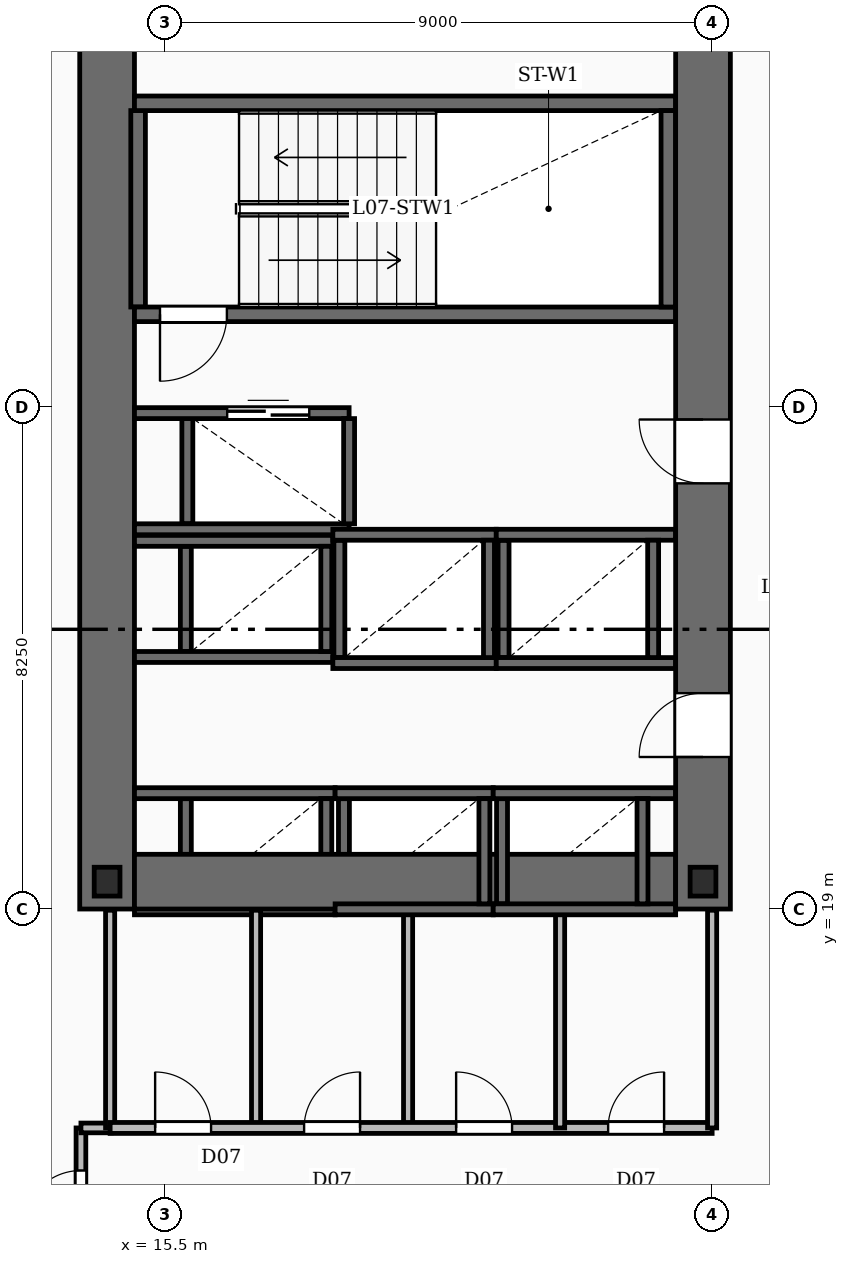
"""IFC4 building model, lengths in metres.
Left out: names, types, materials, properties, quantities, classifications, styles, units other than length and angle.
Written with IfcOpenShell. Run it as: python <this file> out.ifc"""

import sys

from ifc_helpers import new_model, si_unit, direction, frame, frame_2d, origin, origin_2d, place, context, subcontext, project, spatial, rectangle, i_section, extrude, element, fill, save


model = new_model("IFC4")
c1 = context("Model", 3, precision=1e-05, world=origin(), true_north=direction((0.0, 1.0)))
c2 = subcontext(c1, "Body", "Model", "MODEL_VIEW")
j1 = project(units=[si_unit("LENGTHUNIT", "METRE"), si_unit("PLANEANGLEUNIT", "RADIAN")], contexts=[c1])
p1 = place(None, origin())
s1 = spatial("IfcSite", under=j1, at=p1, CompositionType="ELEMENT")
p2 = place(p1, origin())
s2 = spatial("IfcBuilding", under=s1, at=p2, CompositionType="ELEMENT")
p3 = place(p2, frame((0.0, 0.0, 42.0)))
s3 = spatial("IfcBuildingStorey", under=s2, at=p3, CompositionType="ELEMENT", Elevation=42.0)
p4 = place(p3, frame((14.55, 19.0, -0.45), z_axis=(0.0, 0.0, 1.0), x_axis=(0.0, 1.0, 0.0)))
e1 = element("IfcWall", 1, at=p4, inside=s3, PredefinedType="SHEAR", context=c2, shape_type="SweptSolid", body=[
    extrude(rectangle(XDim=15.3, YDim=0.9, at=frame_2d((7.65, 0.0))), origin(), (0.0, 0.0, 1.0), 3.93),
])
p5 = place(p3, frame((24.35, 19.0, -0.45), z_axis=(0.0, 0.0, 1.0), x_axis=(0.0, 1.0, 0.0)))
e2 = element("IfcWall", 2, at=p5, inside=s3, PredefinedType="SHEAR", context=c2, shape_type="SweptSolid", body=[
    extrude(rectangle(XDim=15.3, YDim=0.9, at=frame_2d((7.65, 0.0))), origin(), (0.0, 0.0, 1.0), 3.93),
])
p6 = place(p5, frame((2.5, 0.0, 0.45)))
e3 = element("IfcOpeningElement", 3, at=p6, cuts=e2, PredefinedType="OPENING", context=c2, shape_type="SweptSolid", body=[
    extrude(rectangle(XDim=1.05, YDim=2.15, at=frame_2d((0.525, 1.075))), frame((0.0, 0.46, 0.0), z_axis=(0.0, -1.0, 0.0), x_axis=(1.0, 0.0, 0.0)), (0.0, 0.0, 1.0), 0.92),
])
p7 = place(p5, frame((7.0, 0.0, 0.45)))
e4 = element("IfcOpeningElement", 4, at=p7, cuts=e2, PredefinedType="OPENING", context=c2, shape_type="SweptSolid", body=[
    extrude(rectangle(XDim=1.05, YDim=2.15, at=frame_2d((0.525, 1.075))), frame((0.0, 0.46, 0.0), z_axis=(0.0, -1.0, 0.0), x_axis=(1.0, 0.0, 0.0)), (0.0, 0.0, 1.0), 0.92),
])
p8 = place(p3, frame((15.0, 19.45, -0.45), z_axis=(0.0, 0.0, 1.0), x_axis=(1.0, 0.0, 0.0)))
e5 = element("IfcWall", 5, at=p8, inside=s3, PredefinedType="SHEAR", context=c2, shape_type="SweptSolid", body=[
    extrude(rectangle(XDim=8.9, YDim=0.9, at=frame_2d((4.45, 0.0))), origin(), (0.0, 0.0, 1.0), 3.93),
])
for number, where, z_axis, x_axis in (
    (6, (14.55, 19.45, -0.45), (0.0, 0.0, 1.0), (1.0, 0.0, 0.0)),
    (7, (24.35, 19.45, -0.45), (0.0, 0.0, 1.0), (1.0, 0.0, 0.0)),
):
    element("IfcColumn", number, at=place(p3, frame(where, z_axis=z_axis, x_axis=x_axis)), inside=s3, PredefinedType="COLUMN", context=c2, shape_type="SweptSolid", body=[
        extrude(i_section(OverallWidth=0.424, OverallDepth=0.474, WebThickness=0.048, FlangeThickness=0.077, FilletRadius=0.02, at=origin_2d()), origin(), (0.0, 0.0, 1.0), 3.93),
    ])
p9 = place(p3, frame((23.9, 28.78, 0.0), z_axis=(0.0, 0.0, 1.0), x_axis=(-1.0, 0.0, 0.0)))
e8 = element("IfcWall", 8, at=p9, inside=s3, PredefinedType="SOLIDWALL", context=c2, shape_type="SweptSolid", body=[
    extrude(rectangle(XDim=8.9, YDim=0.24, at=frame_2d((4.45, 0.0))), origin(), (0.0, 0.0, 1.0), 3.48),
])
p10 = place(p9, frame((7.38, 0.0, 0.0)))
e9 = element("IfcOpeningElement", 9, at=p10, cuts=e8, PredefinedType="OPENING", context=c2, shape_type="SweptSolid", body=[
    extrude(rectangle(XDim=1.1, YDim=2.15, at=frame_2d((0.55, 1.075))), frame((0.0, 0.13, 0.0), z_axis=(0.0, -1.0, 0.0), x_axis=(1.0, 0.0, 0.0)), (0.0, 0.0, 1.0), 0.26),
])
p11 = place(p3, frame((15.0, 32.25, 0.0), z_axis=(0.0, 0.0, 1.0), x_axis=(1.0, 0.0, 0.0)))
e10 = element("IfcWall", 10, at=p11, inside=s3, PredefinedType="SOLIDWALL", context=c2, shape_type="SweptSolid", body=[
    extrude(rectangle(XDim=8.9, YDim=0.24, at=frame_2d((4.45, 0.0))), origin(), (0.0, 0.0, 1.0), 3.48),
])
for number, where, z_axis, x_axis in (
    (11, (15.06, 28.9, 0.0), (0.0, 0.0, 1.0), (0.0, 1.0, 0.0)),
    (12, (23.78, 28.9, 0.0), (0.0, 0.0, 1.0), (0.0, 1.0, 0.0)),
):
    element("IfcWall", number, at=place(p3, frame(where, z_axis=z_axis, x_axis=x_axis)), inside=s3, PredefinedType="SOLIDWALL", context=c2, shape_type="SweptSolid", body=[
        extrude(rectangle(XDim=3.23, YDim=0.24, at=frame_2d((1.615, 0.0))), origin(), (0.0, 0.0, 1.0), 3.48),
    ])
for number, where, z_axis, x_axis in (
    (13, (15.0, 20.905, 0.0), (0.0, 0.0, 1.0), (1.0, 0.0, 0.0)),
    (14, (15.0, 18.995, 0.0), (0.0, 0.0, 1.0), (1.0, 0.0, 0.0)),
):
    element("IfcWall", number, at=place(p3, frame(where, z_axis=z_axis, x_axis=x_axis)), inside=s3, PredefinedType="SOLIDWALL", context=c2, shape_type="SweptSolid", body=[
        extrude(rectangle(XDim=3.3, YDim=0.18, at=frame_2d((1.65, 0.0))), origin(), (0.0, 0.0, 1.0), 3.48),
    ])
for number, where, z_axis, x_axis in (
    (15, (15.845, 19.085, 0.0), (0.0, 0.0, 1.0), (0.0, 1.0, 0.0)),
    (16, (18.155, 19.085, 0.0), (0.0, 0.0, 1.0), (0.0, 1.0, 0.0)),
):
    element("IfcWall", number, at=place(p3, frame(where, z_axis=z_axis, x_axis=x_axis)), inside=s3, PredefinedType="SOLIDWALL", context=c2, shape_type="SweptSolid", body=[
        extrude(rectangle(XDim=1.73, YDim=0.18, at=frame_2d((0.865, 0.0))), origin(), (0.0, 0.0, 1.0), 3.48),
    ])
for number, where, z_axis, x_axis in (
    (17, (18.3, 20.905, 0.0), (0.0, 0.0, 1.0), (1.0, 0.0, 0.0)),
    (18, (18.3, 18.995, 0.0), (0.0, 0.0, 1.0), (1.0, 0.0, 0.0)),
):
    element("IfcWall", number, at=place(p3, frame(where, z_axis=z_axis, x_axis=x_axis)), inside=s3, PredefinedType="SOLIDWALL", context=c2, shape_type="SweptSolid", body=[
        extrude(rectangle(XDim=2.6, YDim=0.18, at=frame_2d((1.3, 0.0))), origin(), (0.0, 0.0, 1.0), 3.48),
    ])
for number, where, z_axis, x_axis in (
    (19, (18.445, 19.085, 0.0), (0.0, 0.0, 1.0), (0.0, 1.0, 0.0)),
    (20, (20.755, 19.085, 0.0), (0.0, 0.0, 1.0), (0.0, 1.0, 0.0)),
):
    element("IfcWall", number, at=place(p3, frame(where, z_axis=z_axis, x_axis=x_axis)), inside=s3, PredefinedType="SOLIDWALL", context=c2, shape_type="SweptSolid", body=[
        extrude(rectangle(XDim=1.73, YDim=0.18, at=frame_2d((0.865, 0.0))), origin(), (0.0, 0.0, 1.0), 3.48),
    ])
for number, where, z_axis, x_axis in (
    (21, (20.9, 20.905, 0.0), (0.0, 0.0, 1.0), (1.0, 0.0, 0.0)),
    (22, (20.9, 18.995, 0.0), (0.0, 0.0, 1.0), (1.0, 0.0, 0.0)),
):
    element("IfcWall", number, at=place(p3, frame(where, z_axis=z_axis, x_axis=x_axis)), inside=s3, PredefinedType="SOLIDWALL", context=c2, shape_type="SweptSolid", body=[
        extrude(rectangle(XDim=3.0, YDim=0.18, at=frame_2d((1.5, 0.0))), origin(), (0.0, 0.0, 1.0), 3.48),
    ])
for number, where, z_axis, x_axis in (
    (23, (21.045, 19.085, 0.0), (0.0, 0.0, 1.0), (0.0, 1.0, 0.0)),
    (24, (23.355, 19.085, 0.0), (0.0, 0.0, 1.0), (0.0, 1.0, 0.0)),
):
    element("IfcWall", number, at=place(p3, frame(where, z_axis=z_axis, x_axis=x_axis)), inside=s3, PredefinedType="SOLIDWALL", context=c2, shape_type="SweptSolid", body=[
        extrude(rectangle(XDim=1.73, YDim=0.18, at=frame_2d((0.865, 0.0))), origin(), (0.0, 0.0, 1.0), 3.48),
    ])
for number, where, z_axis, x_axis in (
    (25, (15.0, 25.055, 0.0), (0.0, 0.0, 1.0), (1.0, 0.0, 0.0)),
    (26, (15.0, 23.145, 0.0), (0.0, 0.0, 1.0), (1.0, 0.0, 0.0)),
):
    element("IfcWall", number, at=place(p3, frame(where, z_axis=z_axis, x_axis=x_axis)), inside=s3, PredefinedType="SOLIDWALL", context=c2, shape_type="SweptSolid", body=[
        extrude(rectangle(XDim=3.262, YDim=0.18, at=frame_2d((1.631, 0.0))), origin(), (0.0, 0.0, 1.0), 3.48),
    ])
for number, where, z_axis, x_axis in (
    (27, (15.845, 23.235, 0.0), (0.0, 0.0, 1.0), (0.0, 1.0, 0.0)),
    (28, (18.155, 23.235, 0.0), (0.0, 0.0, 1.0), (0.0, 1.0, 0.0)),
):
    element("IfcWall", number, at=place(p3, frame(where, z_axis=z_axis, x_axis=x_axis)), inside=s3, PredefinedType="SOLIDWALL", context=c2, shape_type="SweptSolid", body=[
        extrude(rectangle(XDim=1.73, YDim=0.18, at=frame_2d((0.865, 0.0))), origin(), (0.0, 0.0, 1.0), 3.48),
    ])
for number, where, z_axis, x_axis in (
    (29, (18.262, 25.155, 0.0), (0.0, 0.0, 1.0), (1.0, 0.0, 0.0)),
    (30, (18.262, 23.045, 0.0), (0.0, 0.0, 1.0), (1.0, 0.0, 0.0)),
):
    element("IfcWall", number, at=place(p3, frame(where, z_axis=z_axis, x_axis=x_axis)), inside=s3, PredefinedType="SOLIDWALL", context=c2, shape_type="SweptSolid", body=[
        extrude(rectangle(XDim=2.688, YDim=0.18, at=frame_2d((1.344, 0.0))), origin(), (0.0, 0.0, 1.0), 3.48),
    ])
for number, where, z_axis, x_axis in (
    (31, (18.37, 23.135, 0.0), (0.0, 0.0, 1.0), (0.0, 1.0, 0.0)),
    (32, (20.83, 23.135, 0.0), (0.0, 0.0, 1.0), (0.0, 1.0, 0.0)),
):
    element("IfcWall", number, at=place(p3, frame(where, z_axis=z_axis, x_axis=x_axis)), inside=s3, PredefinedType="SOLIDWALL", context=c2, shape_type="SweptSolid", body=[
        extrude(rectangle(XDim=1.93, YDim=0.18, at=frame_2d((0.965, 0.0))), origin(), (0.0, 0.0, 1.0), 3.48),
    ])
for number, where, z_axis, x_axis in (
    (33, (20.95, 25.155, 0.0), (0.0, 0.0, 1.0), (1.0, 0.0, 0.0)),
    (34, (20.95, 23.045, 0.0), (0.0, 0.0, 1.0), (1.0, 0.0, 0.0)),
):
    element("IfcWall", number, at=place(p3, frame(where, z_axis=z_axis, x_axis=x_axis)), inside=s3, PredefinedType="SOLIDWALL", context=c2, shape_type="SweptSolid", body=[
        extrude(rectangle(XDim=2.95, YDim=0.18, at=frame_2d((1.475, 0.0))), origin(), (0.0, 0.0, 1.0), 3.48),
    ])
for number, where, z_axis, x_axis in (
    (35, (21.07, 23.135, 0.0), (0.0, 0.0, 1.0), (0.0, 1.0, 0.0)),
    (36, (23.53, 23.135, 0.0), (0.0, 0.0, 1.0), (0.0, 1.0, 0.0)),
):
    element("IfcWall", number, at=place(p3, frame(where, z_axis=z_axis, x_axis=x_axis)), inside=s3, PredefinedType="SOLIDWALL", context=c2, shape_type="SweptSolid", body=[
        extrude(rectangle(XDim=1.93, YDim=0.18, at=frame_2d((0.965, 0.0))), origin(), (0.0, 0.0, 1.0), 3.48),
    ])
p12 = place(p3, frame((15.0, 27.155, 0.0), z_axis=(0.0, 0.0, 1.0), x_axis=(1.0, 0.0, 0.0)))
e37 = element("IfcWall", 37, at=p12, inside=s3, PredefinedType="SOLIDWALL", context=c2, shape_type="SweptSolid", body=[
    extrude(rectangle(XDim=3.53, YDim=0.18, at=frame_2d((1.765, 0.0))), origin(), (0.0, 0.0, 1.0), 3.48),
])
p13 = place(p12, frame((1.525, 0.0, 0.0)))
e38 = element("IfcOpeningElement", 38, at=p13, cuts=e37, PredefinedType="OPENING", context=c2, shape_type="SweptSolid", body=[
    extrude(rectangle(XDim=1.35, YDim=2.3, at=frame_2d((0.675, 1.15))), frame((0.0, 0.1, 0.0), z_axis=(0.0, -1.0, 0.0), x_axis=(1.0, 0.0, 0.0)), (0.0, 0.0, 1.0), 0.2),
])
p14 = place(p3, frame((15.0, 25.245, 0.0), z_axis=(0.0, 0.0, 1.0), x_axis=(1.0, 0.0, 0.0)))
e39 = element("IfcWall", 39, at=p14, inside=s3, PredefinedType="SOLIDWALL", context=c2, shape_type="SweptSolid", body=[
    extrude(rectangle(XDim=3.53, YDim=0.18, at=frame_2d((1.765, 0.0))), origin(), (0.0, 0.0, 1.0), 3.48),
])
for number, where, z_axis, x_axis in (
    (40, (15.87, 25.335, 0.0), (0.0, 0.0, 1.0), (0.0, 1.0, 0.0)),
    (41, (18.53, 25.335, 0.0), (0.0, 0.0, 1.0), (0.0, 1.0, 0.0)),
):
    element("IfcWall", number, at=place(p3, frame(where, z_axis=z_axis, x_axis=x_axis)), inside=s3, PredefinedType="SOLIDWALL", context=c2, shape_type="SweptSolid", body=[
        extrude(rectangle(XDim=1.73, YDim=0.18, at=frame_2d((0.865, 0.0))), origin(), (0.0, 0.0, 1.0), 3.48),
    ])
for number, where, z_axis, x_axis in (
    (42, (17.0, 15.4, 0.0), (0.0, 0.0, 1.0), (0.0, 1.0, 0.0)),
    (43, (19.5, 15.4, 0.0), (0.0, 0.0, 1.0), (0.0, 1.0, 0.0)),
    (44, (22.0, 15.4, 0.0), (0.0, 0.0, 1.0), (0.0, 1.0, 0.0)),
):
    element("IfcWall", number, at=place(p3, frame(where, z_axis=z_axis, x_axis=x_axis)), inside=s3, PredefinedType="PARTITIONING", context=c2, shape_type="SweptSolid", body=[
        extrude(rectangle(XDim=3.58, YDim=0.15, at=frame_2d((1.79, 0.0))), origin(), (0.0, 0.0, 1.0), 2.54),
    ])
p15 = place(p3, frame((14.6, 15.4, 0.0), z_axis=(0.0, 0.0, 1.0), x_axis=(1.0, 0.0, 0.0)))
e45 = element("IfcWall", 45, at=p15, inside=s3, PredefinedType="PARTITIONING", context=c2, shape_type="SweptSolid", body=[
    extrude(rectangle(XDim=9.9, YDim=0.18, at=frame_2d((4.95, 0.0))), origin(), (0.0, 0.0, 1.0), 2.54),
])
p16 = place(p15, frame((0.74, 0.0, 0.0)))
e46 = element("IfcOpeningElement", 46, at=p16, cuts=e45, PredefinedType="OPENING", context=c2, shape_type="SweptSolid", body=[
    extrude(rectangle(XDim=0.92, YDim=2.1, at=frame_2d((0.46, 1.05))), frame((0.0, 0.1, 0.0), z_axis=(0.0, -1.0, 0.0), x_axis=(1.0, 0.0, 0.0)), (0.0, 0.0, 1.0), 0.2),
])
p17 = place(p15, frame((3.19, 0.0, 0.0)))
e47 = element("IfcOpeningElement", 47, at=p17, cuts=e45, PredefinedType="OPENING", context=c2, shape_type="SweptSolid", body=[
    extrude(rectangle(XDim=0.92, YDim=2.1, at=frame_2d((0.46, 1.05))), frame((0.0, 0.1, 0.0), z_axis=(0.0, -1.0, 0.0), x_axis=(1.0, 0.0, 0.0)), (0.0, 0.0, 1.0), 0.2),
])
p18 = place(p15, frame((5.69, 0.0, 0.0)))
e48 = element("IfcOpeningElement", 48, at=p18, cuts=e45, PredefinedType="OPENING", context=c2, shape_type="SweptSolid", body=[
    extrude(rectangle(XDim=0.92, YDim=2.1, at=frame_2d((0.46, 1.05))), frame((0.0, 0.1, 0.0), z_axis=(0.0, -1.0, 0.0), x_axis=(1.0, 0.0, 0.0)), (0.0, 0.0, 1.0), 0.2),
])
p19 = place(p15, frame((8.19, 0.0, 0.0)))
e49 = element("IfcOpeningElement", 49, at=p19, cuts=e45, PredefinedType="OPENING", context=c2, shape_type="SweptSolid", body=[
    extrude(rectangle(XDim=0.92, YDim=2.1, at=frame_2d((0.46, 1.05))), frame((0.0, 0.1, 0.0), z_axis=(0.0, -1.0, 0.0), x_axis=(1.0, 0.0, 0.0)), (0.0, 0.0, 1.0), 0.2),
])
for number, where, z_axis, x_axis in (
    (50, (14.6, 15.4, 0.0), (0.0, 0.0, 1.0), (0.0, 1.0, 0.0)),
    (51, (24.5, 15.4, 0.0), (0.0, 0.0, 1.0), (0.0, 1.0, 0.0)),
):
    element("IfcWall", number, at=place(p3, frame(where, z_axis=z_axis, x_axis=x_axis)), inside=s3, PredefinedType="PARTITIONING", context=c2, shape_type="SweptSolid", body=[
        extrude(rectangle(XDim=3.58, YDim=0.15, at=frame_2d((1.79, 0.0))), origin(), (0.0, 0.0, 1.0), 2.54),
    ])
p20 = place(p3, frame((14.12, 13.1, 0.0), z_axis=(0.0, 0.0, 1.0), x_axis=(0.0, 1.0, 0.0)))
e52 = element("IfcWall", 52, at=p20, inside=s3, PredefinedType="PARTITIONING", context=c2, shape_type="SweptSolid", body=[
    extrude(rectangle(XDim=2.3, YDim=0.16, at=frame_2d((1.15, 0.0))), origin(), (0.0, 0.0, 1.0), 2.54),
])
p21 = place(p20, frame((0.65, 0.0, 0.0)))
e53 = element("IfcOpeningElement", 53, at=p21, cuts=e52, PredefinedType="OPENING", context=c2, shape_type="SweptSolid", body=[
    extrude(rectangle(XDim=0.95, YDim=2.15, at=frame_2d((0.475, 1.075))), frame((0.0, 0.09, 0.0), z_axis=(0.0, -1.0, 0.0), x_axis=(1.0, 0.0, 0.0)), (0.0, 0.0, 1.0), 0.18),
])
p22 = place(p3, frame((14.12, 15.4, 0.0), z_axis=(0.0, 0.0, 1.0), x_axis=(1.0, 0.0, 0.0)))
e54 = element("IfcWall", 54, at=p22, inside=s3, PredefinedType="PARTITIONING", context=c2, shape_type="SweptSolid", body=[
    extrude(rectangle(XDim=0.5, YDim=0.16, at=frame_2d((0.25, 0.0))), origin(), (0.0, 0.0, 1.0), 2.54),
])
p23 = place(p6, origin())
e55 = element("IfcDoor", 55, at=p23, inside=s3, OperationType="SINGLE_SWING_LEFT", PredefinedType="DOOR", context=c2, shape_type="SweptSolid", body=[
    extrude(rectangle(XDim=1.05, YDim=2.15, at=frame_2d((0.525, 1.075))), frame((0.0, 0.025, 0.0), z_axis=(0.0, -1.0, 0.0), x_axis=(1.0, 0.0, 0.0)), (0.0, 0.0, 1.0), 0.05),
])
fill(e3, e55)
p24 = place(p7, origin())
e56 = element("IfcDoor", 56, at=p24, inside=s3, OperationType="SINGLE_SWING_RIGHT", PredefinedType="DOOR", context=c2, shape_type="SweptSolid", body=[
    extrude(rectangle(XDim=1.05, YDim=2.15, at=frame_2d((0.525, 1.075))), frame((0.0, 0.025, 0.0), z_axis=(0.0, -1.0, 0.0), x_axis=(1.0, 0.0, 0.0)), (0.0, 0.0, 1.0), 0.05),
])
fill(e4, e56)
p25 = place(p10, origin())
e57 = element("IfcDoor", 57, at=p25, inside=s3, OperationType="SINGLE_SWING_RIGHT", PredefinedType="DOOR", context=c2, shape_type="SweptSolid", body=[
    extrude(rectangle(XDim=1.1, YDim=2.15, at=frame_2d((0.55, 1.075))), frame((0.0, 0.025, 0.0), z_axis=(0.0, -1.0, 0.0), x_axis=(1.0, 0.0, 0.0)), (0.0, 0.0, 1.0), 0.05),
])
fill(e9, e57)
p26 = place(p13, origin())
e58 = element("IfcDoor", 58, at=p26, inside=s3, OperationType="DOUBLE_DOOR_SLIDING", PredefinedType="DOOR", context=c2, shape_type="SweptSolid", body=[
    extrude(rectangle(XDim=1.35, YDim=2.3, at=frame_2d((0.675, 1.15))), frame((0.0, 0.025, 0.0), z_axis=(0.0, -1.0, 0.0), x_axis=(1.0, 0.0, 0.0)), (0.0, 0.0, 1.0), 0.05),
])
fill(e38, e58)
p27 = place(p16, origin())
e59 = element("IfcDoor", 59, at=p27, inside=s3, OperationType="SINGLE_SWING_LEFT", PredefinedType="DOOR", context=c2, shape_type="SweptSolid", body=[
    extrude(rectangle(XDim=0.92, YDim=2.1, at=frame_2d((0.46, 1.05))), frame((0.0, 0.025, 0.0), z_axis=(0.0, -1.0, 0.0), x_axis=(1.0, 0.0, 0.0)), (0.0, 0.0, 1.0), 0.05),
])
fill(e46, e59)
p28 = place(p17, origin())
e60 = element("IfcDoor", 60, at=p28, inside=s3, OperationType="SINGLE_SWING_RIGHT", PredefinedType="DOOR", context=c2, shape_type="SweptSolid", body=[
    extrude(rectangle(XDim=0.92, YDim=2.1, at=frame_2d((0.46, 1.05))), frame((0.0, 0.025, 0.0), z_axis=(0.0, -1.0, 0.0), x_axis=(1.0, 0.0, 0.0)), (0.0, 0.0, 1.0), 0.05),
])
fill(e47, e60)
p29 = place(p18, origin())
e61 = element("IfcDoor", 61, at=p29, inside=s3, OperationType="SINGLE_SWING_LEFT", PredefinedType="DOOR", context=c2, shape_type="SweptSolid", body=[
    extrude(rectangle(XDim=0.92, YDim=2.1, at=frame_2d((0.46, 1.05))), frame((0.0, 0.025, 0.0), z_axis=(0.0, -1.0, 0.0), x_axis=(1.0, 0.0, 0.0)), (0.0, 0.0, 1.0), 0.05),
])
fill(e48, e61)
p30 = place(p19, origin())
e62 = element("IfcDoor", 62, at=p30, inside=s3, OperationType="SINGLE_SWING_RIGHT", PredefinedType="DOOR", context=c2, shape_type="SweptSolid", body=[
    extrude(rectangle(XDim=0.92, YDim=2.1, at=frame_2d((0.46, 1.05))), frame((0.0, 0.025, 0.0), z_axis=(0.0, -1.0, 0.0), x_axis=(1.0, 0.0, 0.0)), (0.0, 0.0, 1.0), 0.05),
])
fill(e49, e62)
p31 = place(p21, origin())
e63 = element("IfcDoor", 63, at=p31, inside=s3, OperationType="SINGLE_SWING_LEFT", PredefinedType="DOOR", context=c2, shape_type="SweptSolid", body=[
    extrude(rectangle(XDim=0.95, YDim=2.15, at=frame_2d((0.475, 1.075))), frame((0.0, 0.025, 0.0), z_axis=(0.0, -1.0, 0.0), x_axis=(1.0, 0.0, 0.0)), (0.0, 0.0, 1.0), 0.05),
])
fill(e53, e63)
save(model, sys.argv[1])
